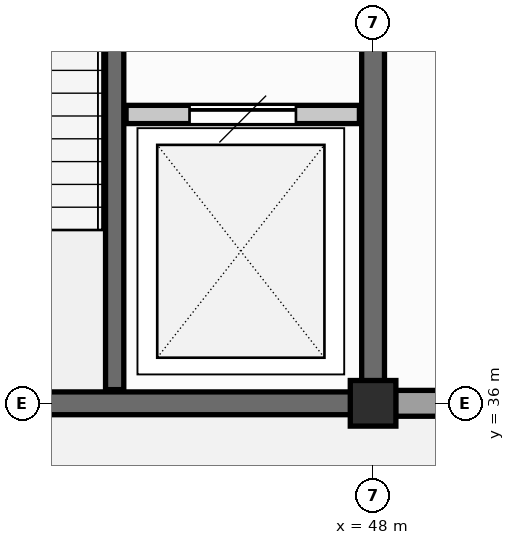
"""IFC4 building model, lengths in metres.
Left out: names, types, materials, properties, quantities, classifications, styles, units other than length and angle.
Written with IfcOpenShell. Run it as: python <this file> out.ifc"""

import sys

from ifc_helpers import new_model, si_unit, direction, frame, frame_2d, origin, origin_2d, place, context, subcontext, project, spatial, rectangle, extrude, element, fill, save


model = new_model("IFC4")
c1 = context("Model", 3, precision=1e-05, world=origin(), true_north=direction((0.0, 1.0)))
c2 = subcontext(c1, "Body", "Model", "MODEL_VIEW")
j1 = project(units=[si_unit("LENGTHUNIT", "METRE"), si_unit("PLANEANGLEUNIT", "RADIAN")], contexts=[c1])
p1 = place(None, origin())
s1 = spatial("IfcSite", under=j1, at=p1, CompositionType="ELEMENT")
p2 = place(p1, origin())
s2 = spatial("IfcBuilding", under=s1, at=p2, CompositionType="ELEMENT")
p3 = place(p2, frame((0.0, 0.0, 4.8)))
s3 = spatial("IfcBuildingStorey", under=s2, at=p3, CompositionType="ELEMENT", Elevation=4.8)
p4 = place(p3, frame((48.0, 36.0, 0.0), z_axis=(0.0, 0.0, 1.0), x_axis=(1.0, 0.0, 0.0)))
e1 = element("IfcColumn", 1, at=p4, inside=s3, PredefinedType="COLUMN", context=c2, shape_type="SweptSolid", body=[
    extrude(rectangle(XDim=0.6, YDim=0.6, at=origin_2d()), origin(), (0.0, 0.0, 1.0), 4.2),
])
p5 = place(p3, frame((48.295, 36.0, 0.0), z_axis=(0.0, 0.0, 1.0), x_axis=(1.0, 0.0, 0.0)))
e2 = element("IfcWall", 2, at=p5, inside=s3, PredefinedType="SOLIDWALL", context=c2, shape_type="SweptSolid", body=[
    extrude(rectangle(XDim=7.41, YDim=0.34, at=frame_2d((3.705, 0.0))), origin(), (0.0, 0.0, 1.0), 3.05),
])
p6 = place(p3, frame((40.295, 36.0, 0.0), z_axis=(0.0, 0.0, 1.0), x_axis=(1.0, 0.0, 0.0)))
e3 = element("IfcWall", 3, at=p6, inside=s3, PredefinedType="SHEAR", context=c2, shape_type="SweptSolid", body=[
    extrude(rectangle(XDim=7.41, YDim=0.3, at=frame_2d((3.705, 0.0))), origin(), (0.0, 0.0, 1.0), 3.905),
])
p7 = place(p3, frame((48.0, 36.295, 0.0), z_axis=(0.0, 0.0, 1.0), x_axis=(0.0, 1.0, 0.0)))
e4 = element("IfcWall", 4, at=p7, inside=s3, PredefinedType="SHEAR", context=c2, shape_type="SweptSolid", body=[
    extrude(rectangle(XDim=8.41, YDim=0.3, at=frame_2d((4.205, 0.0))), origin(), (0.0, 0.0, 1.0), 3.905),
])
p8 = place(p3, frame((44.6, 36.18, 0.0), z_axis=(0.0, 0.0, 1.0), x_axis=(0.0, 1.0, 0.0)))
e5 = element("IfcWall", 5, at=p8, inside=s3, PredefinedType="SHEAR", context=c2, shape_type="SweptSolid", body=[
    extrude(rectangle(XDim=8.64, YDim=0.24, at=frame_2d((4.32, 0.0))), origin(), (0.0, 0.0, 1.0), 3.905),
])
p9 = place(p8, frame((6.02, 0.0, 0.0)))
e6 = element("IfcOpeningElement", 6, at=p9, cuts=e5, PredefinedType="OPENING", context=c2, shape_type="SweptSolid", body=[
    extrude(rectangle(XDim=1.38, YDim=2.22, at=frame_2d((0.69, 1.11))), frame((0.0, 0.13, 0.0), z_axis=(0.0, -1.0, 0.0), x_axis=(1.0, 0.0, 0.0)), (0.0, 0.0, 1.0), 0.26),
])
p10 = place(p8, frame((7.68, 0.0, 0.0)))
e7 = element("IfcOpeningElement", 7, at=p10, cuts=e5, PredefinedType="OPENING", context=c2, shape_type="SweptSolid", body=[
    extrude(rectangle(XDim=0.9, YDim=2.05, at=frame_2d((0.45, 1.025))), frame((0.0, 0.13, 0.0), z_axis=(0.0, -1.0, 0.0), x_axis=(1.0, 0.0, 0.0)), (0.0, 0.0, 1.0), 0.26),
])
p11 = place(p3, frame((44.75, 39.8, 0.0), z_axis=(0.0, 0.0, 1.0), x_axis=(1.0, 0.0, 0.0)))
e8 = element("IfcWall", 8, at=p11, inside=s3, PredefinedType="SHEAR", context=c2, shape_type="SweptSolid", body=[
    extrude(rectangle(XDim=3.07, YDim=0.24, at=frame_2d((1.535, 0.0))), origin(), (0.0, 0.0, 1.0), 3.255),
])
p12 = place(p11, frame((0.835, 0.0, 0.0)))
e9 = element("IfcOpeningElement", 9, at=p12, cuts=e8, PredefinedType="OPENING", context=c2, shape_type="SweptSolid", body=[
    extrude(rectangle(XDim=1.4, YDim=2.3, at=frame_2d((0.7, 1.15))), frame((0.0, 0.13, 0.0), z_axis=(0.0, -1.0, 0.0), x_axis=(1.0, 0.0, 0.0)), (0.0, 0.0, 1.0), 0.26),
])
p13 = place(p12, origin())
e10 = element("IfcDoor", 10, at=p13, inside=s3, OperationType="SLIDING_TO_LEFT", PredefinedType="DOOR", context=c2, shape_type="SweptSolid", body=[
    extrude(rectangle(XDim=1.4, YDim=2.3, at=frame_2d((0.7, 1.15))), frame((0.0, 0.025, 0.0), z_axis=(0.0, -1.0, 0.0), x_axis=(1.0, 0.0, 0.0)), (0.0, 0.0, 1.0), 0.05),
])
fill(e9, e10)
save(model, sys.argv[1])
